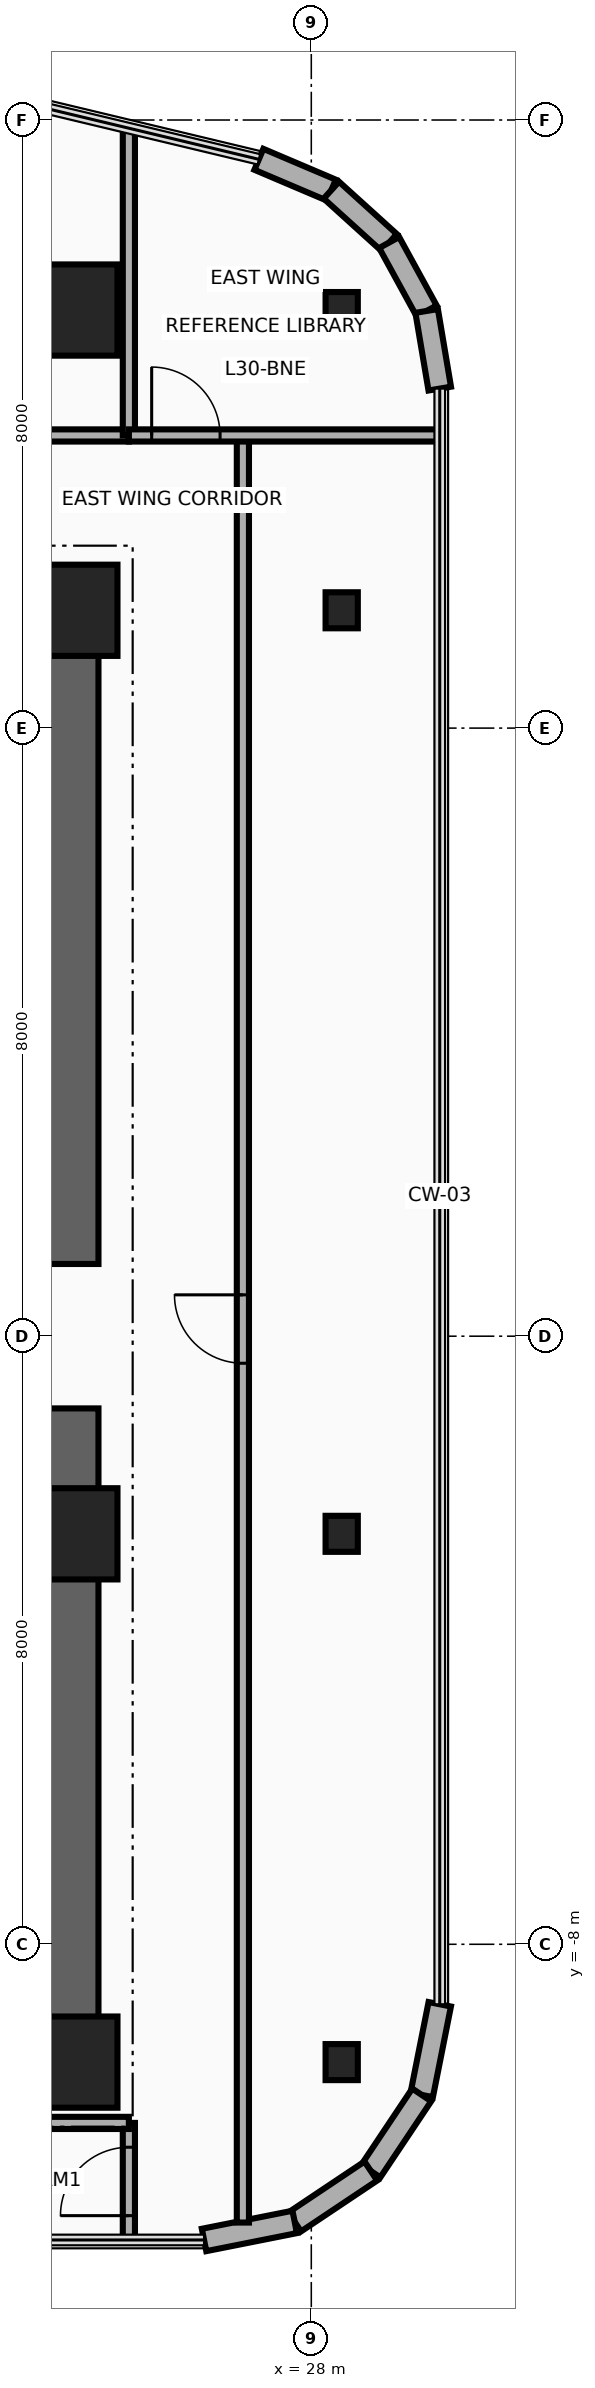
"""IFC4 building model, lengths in metres.
Left out: names, types, materials, properties, quantities, classifications, styles, units other than length and angle.
Written with IfcOpenShell. Run it as: python <this file> out.ifc"""

import sys

from ifc_helpers import new_model, si_unit, direction, frame, frame_2d, origin, origin_2d, place, context, subcontext, project, spatial, rectangle, i_section, extrude, source, transform, mapped, element, fill, save


model = new_model("IFC4")
c1 = context("Model", 3, precision=1e-05, world=origin(), true_north=direction((0.0, 1.0)))
c2 = subcontext(c1, "Body", "Model", "MODEL_VIEW")
j1 = project(units=[si_unit("LENGTHUNIT", "METRE"), si_unit("PLANEANGLEUNIT", "RADIAN")], contexts=[c1])
p1 = place(None, origin())
s1 = spatial("IfcSite", under=j1, at=p1, CompositionType="ELEMENT")
p2 = place(p1, origin())
s2 = spatial("IfcBuilding", under=s1, at=p2, CompositionType="ELEMENT")
p3 = place(p2, frame((0.0, 0.0, 120.5)))
s3 = spatial("IfcBuildingStorey", under=s2, at=p3, CompositionType="ELEMENT", Elevation=120.5)
for number, where, z_axis, x_axis in (
    (1, (24.85, -9.9, 0.0), (0.0, 0.0, 1.0), (0.0, 1.0, 0.0)),
    (2, (24.85, 0.95, 0.0), (0.0, 0.0, 1.0), (0.0, 1.0, 0.0)),
):
    element("IfcWall", number, at=place(p3, frame(where, z_axis=z_axis, x_axis=x_axis)), inside=s3, PredefinedType="SHEAR", context=c2, shape_type="SweptSolid", body=[
        extrude(rectangle(XDim=8.95, YDim=0.7, at=frame_2d((4.475, 0.0))), origin(), (0.0, 0.0, 1.0), 3.46),
    ])
for number, where, z_axis, x_axis in (
    (3, (15.85, 9.55, 0.0), (0.0, 0.0, 1.0), (1.0, 0.0, 0.0)),
    (4, (15.85, -9.55, 0.0), (0.0, 0.0, 1.0), (1.0, 0.0, 0.0)),
):
    element("IfcWall", number, at=place(p3, frame(where, z_axis=z_axis, x_axis=x_axis)), inside=s3, PredefinedType="SHEAR", context=c2, shape_type="SweptSolid", body=[
        extrude(rectangle(XDim=9.0, YDim=0.7, at=frame_2d((4.5, 0.0))), origin(), (0.0, 0.0, 1.0), 3.46),
    ])
m1 = source(origin(), c2, "Body", "SweptSolid", [
    extrude(rectangle(XDim=1.2, YDim=1.2, at=origin_2d()), origin(), (0.0, 0.0, 1.0), 3.7),
])
p4 = place(p3, frame((24.85, -9.55, 0.0), z_axis=(0.0, 0.0, 1.0), x_axis=(1.0, 0.0, 0.0)))
e5 = element("IfcColumn", 5, at=p4, inside=s3, PredefinedType="COLUMN", context=c2, shape_type="MappedRepresentation", body=[
    mapped(m1, transform((0.0, 0.0, 0.0), x_axis=(1.0, 0.0, 0.0), y_axis=(0.0, 1.0, 0.0), z_axis=(0.0, 0.0, 1.0), scale=1.0)),
])
m2 = source(origin(), c2, "Body", "SweptSolid", [
    extrude(i_section(OverallWidth=0.424, OverallDepth=0.474, WebThickness=0.048, FlangeThickness=0.077, at=origin_2d()), origin(), (0.0, 0.0, 1.0), 3.7),
])
p5 = place(p3, frame((28.4, -9.55, 0.0), z_axis=(0.0, 0.0, 1.0), x_axis=(1.0, 0.0, 0.0)))
e6 = element("IfcColumn", 6, at=p5, inside=s3, PredefinedType="COLUMN", context=c2, shape_type="MappedRepresentation", body=[
    mapped(m2, transform((0.0, 0.0, 0.0), x_axis=(1.0, 0.0, 0.0), y_axis=(0.0, 1.0, 0.0), z_axis=(0.0, 0.0, 1.0), scale=1.0)),
])
p6 = place(p3, frame((24.85, -2.6, 0.0), z_axis=(0.0, 0.0, 1.0), x_axis=(1.0, 0.0, 0.0)))
e7 = element("IfcColumn", 7, at=p6, inside=s3, PredefinedType="COLUMN", context=c2, shape_type="MappedRepresentation", body=[
    mapped(m1, transform((0.0, 0.0, 0.0), x_axis=(1.0, 0.0, 0.0), y_axis=(0.0, 1.0, 0.0), z_axis=(0.0, 0.0, 1.0), scale=1.0)),
])
p7 = place(p3, frame((28.4, -2.6, 0.0), z_axis=(0.0, 0.0, 1.0), x_axis=(1.0, 0.0, 0.0)))
e8 = element("IfcColumn", 8, at=p7, inside=s3, PredefinedType="COLUMN", context=c2, shape_type="MappedRepresentation", body=[
    mapped(m2, transform((0.0, 0.0, 0.0), x_axis=(1.0, 0.0, 0.0), y_axis=(0.0, 1.0, 0.0), z_axis=(0.0, 0.0, 1.0), scale=1.0)),
])
p8 = place(p3, frame((24.85, 9.55, 0.0), z_axis=(0.0, 0.0, 1.0), x_axis=(1.0, 0.0, 0.0)))
e9 = element("IfcColumn", 9, at=p8, inside=s3, PredefinedType="COLUMN", context=c2, shape_type="MappedRepresentation", body=[
    mapped(m1, transform((0.0, 0.0, 0.0), x_axis=(1.0, 0.0, 0.0), y_axis=(0.0, 1.0, 0.0), z_axis=(0.0, 0.0, 1.0), scale=1.0)),
])
p9 = place(p3, frame((28.4, 9.55, 0.0), z_axis=(0.0, 0.0, 1.0), x_axis=(1.0, 0.0, 0.0)))
e10 = element("IfcColumn", 10, at=p9, inside=s3, PredefinedType="COLUMN", context=c2, shape_type="MappedRepresentation", body=[
    mapped(m2, transform((0.0, 0.0, 0.0), x_axis=(1.0, 0.0, 0.0), y_axis=(0.0, 1.0, 0.0), z_axis=(0.0, 0.0, 1.0), scale=1.0)),
])
p10 = place(p3, frame((24.85, 13.5, 0.0), z_axis=(0.0, 0.0, 1.0), x_axis=(1.0, 0.0, 0.0)))
e11 = element("IfcColumn", 11, at=p10, inside=s3, PredefinedType="COLUMN", context=c2, shape_type="MappedRepresentation", body=[
    mapped(m1, transform((0.0, 0.0, 0.0), x_axis=(1.0, 0.0, 0.0), y_axis=(0.0, 1.0, 0.0), z_axis=(0.0, 0.0, 1.0), scale=1.0)),
])
p11 = place(p3, frame((28.4, 13.5, 0.0), z_axis=(0.0, 0.0, 1.0), x_axis=(1.0, 0.0, 0.0)))
e12 = element("IfcColumn", 12, at=p11, inside=s3, PredefinedType="COLUMN", context=c2, shape_type="MappedRepresentation", body=[
    mapped(m2, transform((0.0, 0.0, 0.0), x_axis=(1.0, 0.0, 0.0), y_axis=(0.0, 1.0, 0.0), z_axis=(0.0, 0.0, 1.0), scale=1.0)),
])
p12 = place(p3, frame((27.31, 15.483, 0.0), z_axis=(0.0, 0.0, 1.0), x_axis=(0.920250328759, -0.391330208927, 0.0)))
e13 = element("IfcWall", 13, at=p12, inside=s3, PredefinedType="SOLIDWALL", context=c2, shape_type="SweptSolid", body=[
    extrude(rectangle(XDim=1.036, YDim=0.3, at=frame_2d((0.518, 0.0))), origin(), (0.0, 0.0, 1.0), 3.46),
])
p13 = place(p3, frame((28.264, 15.077, 0.0), z_axis=(0.0, 0.0, 1.0), x_axis=(0.741208839713, -0.671274501178, 0.0)))
e14 = element("IfcWall", 14, at=p13, inside=s3, PredefinedType="SOLIDWALL", context=c2, shape_type="SweptSolid", body=[
    extrude(rectangle(XDim=1.026, YDim=0.3, at=frame_2d((0.513, 0.0))), origin(), (0.0, 0.0, 1.0), 3.46),
])
p14 = place(p3, frame((29.025, 14.388, 0.0), z_axis=(0.0, 0.0, 1.0), x_axis=(0.480284137298, -0.87711296163, 0.0)))
e15 = element("IfcWall", 15, at=p14, inside=s3, PredefinedType="SOLIDWALL", context=c2, shape_type="SweptSolid", body=[
    extrude(rectangle(XDim=1.027, YDim=0.3, at=frame_2d((0.513, 0.0))), origin(), (0.0, 0.0, 1.0), 3.46),
])
p15 = place(p3, frame((29.518, 13.488, 0.0), z_axis=(0.0, 0.0, 1.0), x_axis=(0.166156796952, -0.986099345313, 0.0)))
e16 = element("IfcWall", 16, at=p15, inside=s3, PredefinedType="SOLIDWALL", context=c2, shape_type="SweptSolid", body=[
    extrude(rectangle(XDim=1.036, YDim=0.3, at=frame_2d((0.518, 0.0))), origin(), (0.0, 0.0, 1.0), 3.46),
])
p16 = place(p3, frame((29.69, -8.789, 0.0), z_axis=(0.0, 0.0, 1.0), x_axis=(-0.194996050505, -0.980804027463, 0.0)))
e17 = element("IfcWall", 17, at=p16, inside=s3, PredefinedType="SOLIDWALL", context=c2, shape_type="SweptSolid", body=[
    extrude(rectangle(XDim=1.216, YDim=0.3, at=frame_2d((0.608, 0.0))), origin(), (0.0, 0.0, 1.0), 3.46),
])
for number, where, z_axis, x_axis in (
    (18, (29.453, -9.982, 0.0), (0.0, 0.0, 1.0), (-0.556, -0.831, 0.0)),
    (19, (28.783, -10.983, 0.0), (0.0, 0.0, 1.0), (-0.831, -0.556, 0.0)),
):
    element("IfcWall", number, at=place(p3, frame(where, z_axis=z_axis, x_axis=x_axis)), inside=s3, PredefinedType="SOLIDWALL", context=c2, shape_type="SweptSolid", body=[
        extrude(rectangle(XDim=1.205, YDim=0.3, at=frame_2d((0.603, 0.0))), origin(), (0.0, 0.0, 1.0), 3.46),
    ])
p17 = place(p3, frame((27.782, -11.653, 0.0), z_axis=(0.0, 0.0, 1.0), x_axis=(-0.980811661072, -0.194957650543, 0.0)))
e20 = element("IfcWall", 20, at=p17, inside=s3, PredefinedType="SOLIDWALL", context=c2, shape_type="SweptSolid", body=[
    extrude(rectangle(XDim=1.216, YDim=0.3, at=frame_2d((0.608, 0.0))), origin(), (0.0, 0.0, 1.0), 3.46),
])
p18 = place(p3, frame((15.4, 11.85, 0.0), z_axis=(0.0, 0.0, 1.0), x_axis=(1.0, 0.0, 0.0)))
e21 = element("IfcWall", 21, at=p18, inside=s3, PredefinedType="PARTITIONING", context=c2, shape_type="SweptSolid", body=[
    extrude(rectangle(XDim=10.2, YDim=0.16, at=frame_2d((5.1, 0.0))), origin(), (0.0, 0.0, 1.0), 2.834),
])
p19 = place(p18, frame((4.65, 0.0, 0.0)))
e22 = element("IfcOpeningElement", 22, at=p19, cuts=e21, PredefinedType="OPENING", context=c2, shape_type="SweptSolid", body=[
    extrude(rectangle(XDim=0.9, YDim=2.1, at=frame_2d((0.45, 1.05))), frame((0.0, 0.095, 0.0), z_axis=(0.0, -1.0, 0.0), x_axis=(1.0, 0.0, 0.0)), (0.0, 0.0, 1.0), 0.19),
])
p20 = place(p3, frame((25.6, 11.85, 0.0), z_axis=(0.0, 0.0, 1.0), x_axis=(0.0, 1.0, 0.0)))
e23 = element("IfcWall", 23, at=p20, inside=s3, PredefinedType="PARTITIONING", context=c2, shape_type="SweptSolid", body=[
    extrude(rectangle(XDim=4.042, YDim=0.16, at=frame_2d((2.021, 0.0))), origin(), (0.0, 0.0, 1.0), 2.666),
])
p21 = place(p3, frame((25.6, -11.89, 0.0), z_axis=(0.0, 0.0, 1.0), x_axis=(0.0, 1.0, 0.0)))
e24 = element("IfcWall", 24, at=p21, inside=s3, PredefinedType="PARTITIONING", context=c2, shape_type="SweptSolid", body=[
    extrude(rectangle(XDim=1.54, YDim=0.16, at=frame_2d((0.77, 0.0))), origin(), (0.0, 0.0, 1.0), 3.46),
])
p22 = place(p21, frame((0.32, 0.0, 0.0)))
e25 = element("IfcOpeningElement", 25, at=p22, cuts=e24, PredefinedType="OPENING", context=c2, shape_type="SweptSolid", body=[
    extrude(rectangle(XDim=0.9, YDim=2.1, at=frame_2d((0.45, 1.05))), frame((0.0, 0.095, 0.0), z_axis=(0.0, -1.0, 0.0), x_axis=(1.0, 0.0, 0.0)), (0.0, 0.0, 1.0), 0.19),
])
p23 = place(p3, frame((14.044, -10.35, 0.0), z_axis=(0.0, 0.0, 1.0), x_axis=(1.0, 0.0, 0.0)))
e26 = element("IfcWall", 26, at=p23, inside=s3, PredefinedType="PARTITIONING", context=c2, shape_type="SweptSolid", body=[
    extrude(rectangle(XDim=11.556, YDim=0.16, at=frame_2d((5.778, 0.0))), origin(), (0.0, 0.0, 1.0), 3.46),
])
p24 = place(p3, frame((27.1, -11.661, 0.0), z_axis=(0.0, 0.0, 1.0), x_axis=(0.0, 1.0, 0.0)))
e27 = element("IfcWall", 27, at=p24, inside=s3, PredefinedType="PARTITIONING", context=c2, shape_type="SweptSolid", body=[
    extrude(rectangle(XDim=23.511, YDim=0.16, at=frame_2d((11.755, 0.0))), origin(), (0.0, 0.0, 1.0), 2.666),
])
p25 = place(p24, frame((11.305, 0.0, 0.0)))
e28 = element("IfcOpeningElement", 28, at=p25, cuts=e27, PredefinedType="OPENING", context=c2, shape_type="SweptSolid", body=[
    extrude(rectangle(XDim=0.9, YDim=2.1, at=frame_2d((0.45, 1.05))), frame((0.0, 0.095, 0.0), z_axis=(0.0, -1.0, 0.0), x_axis=(1.0, 0.0, 0.0)), (0.0, 0.0, 1.0), 0.19),
])
p26 = place(p3, frame((25.6, 11.85, 0.0), z_axis=(0.0, 0.0, 1.0), x_axis=(1.0, 0.0, 0.0)))
e29 = element("IfcWall", 29, at=p26, inside=s3, PredefinedType="PARTITIONING", context=c2, shape_type="SweptSolid", body=[
    extrude(rectangle(XDim=4.09, YDim=0.16, at=frame_2d((2.045, 0.0))), origin(), (0.0, 0.0, 1.0), 2.896),
])
p27 = place(p26, frame((0.3, 0.0, 0.0)))
e30 = element("IfcOpeningElement", 30, at=p27, cuts=e29, PredefinedType="OPENING", context=c2, shape_type="SweptSolid", body=[
    extrude(rectangle(XDim=0.9, YDim=2.1, at=frame_2d((0.45, 1.05))), frame((0.0, 0.095, 0.0), z_axis=(0.0, -1.0, 0.0), x_axis=(1.0, 0.0, 0.0)), (0.0, 0.0, 1.0), 0.19),
])
p28 = place(p22, origin())
e31 = element("IfcDoor", 31, at=p28, inside=s3, OperationType="SINGLE_SWING_RIGHT", PredefinedType="DOOR", context=c2, shape_type="SweptSolid", body=[
    extrude(rectangle(XDim=0.9, YDim=2.1, at=frame_2d((0.45, 1.05))), frame((0.0, 0.025, 0.0), z_axis=(0.0, -1.0, 0.0), x_axis=(1.0, 0.0, 0.0)), (0.0, 0.0, 1.0), 0.05),
])
fill(e25, e31)
p29 = place(p27, origin())
e32 = element("IfcDoor", 32, at=p29, inside=s3, OperationType="SINGLE_SWING_LEFT", PredefinedType="DOOR", context=c2, shape_type="SweptSolid", body=[
    extrude(rectangle(XDim=0.9, YDim=2.1, at=frame_2d((0.45, 1.05))), frame((0.0, 0.025, 0.0), z_axis=(0.0, -1.0, 0.0), x_axis=(1.0, 0.0, 0.0)), (0.0, 0.0, 1.0), 0.05),
])
fill(e30, e32)
p30 = place(p25, origin())
e33 = element("IfcDoor", 33, at=p30, inside=s3, OperationType="SINGLE_SWING_RIGHT", PredefinedType="DOOR", context=c2, shape_type="SweptSolid", body=[
    extrude(rectangle(XDim=0.9, YDim=2.1, at=frame_2d((0.45, 1.05))), frame((0.0, 0.025, 0.0), z_axis=(0.0, -1.0, 0.0), x_axis=(1.0, 0.0, 0.0)), (0.0, 0.0, 1.0), 0.05),
])
fill(e28, e33)
save(model, sys.argv[1])
